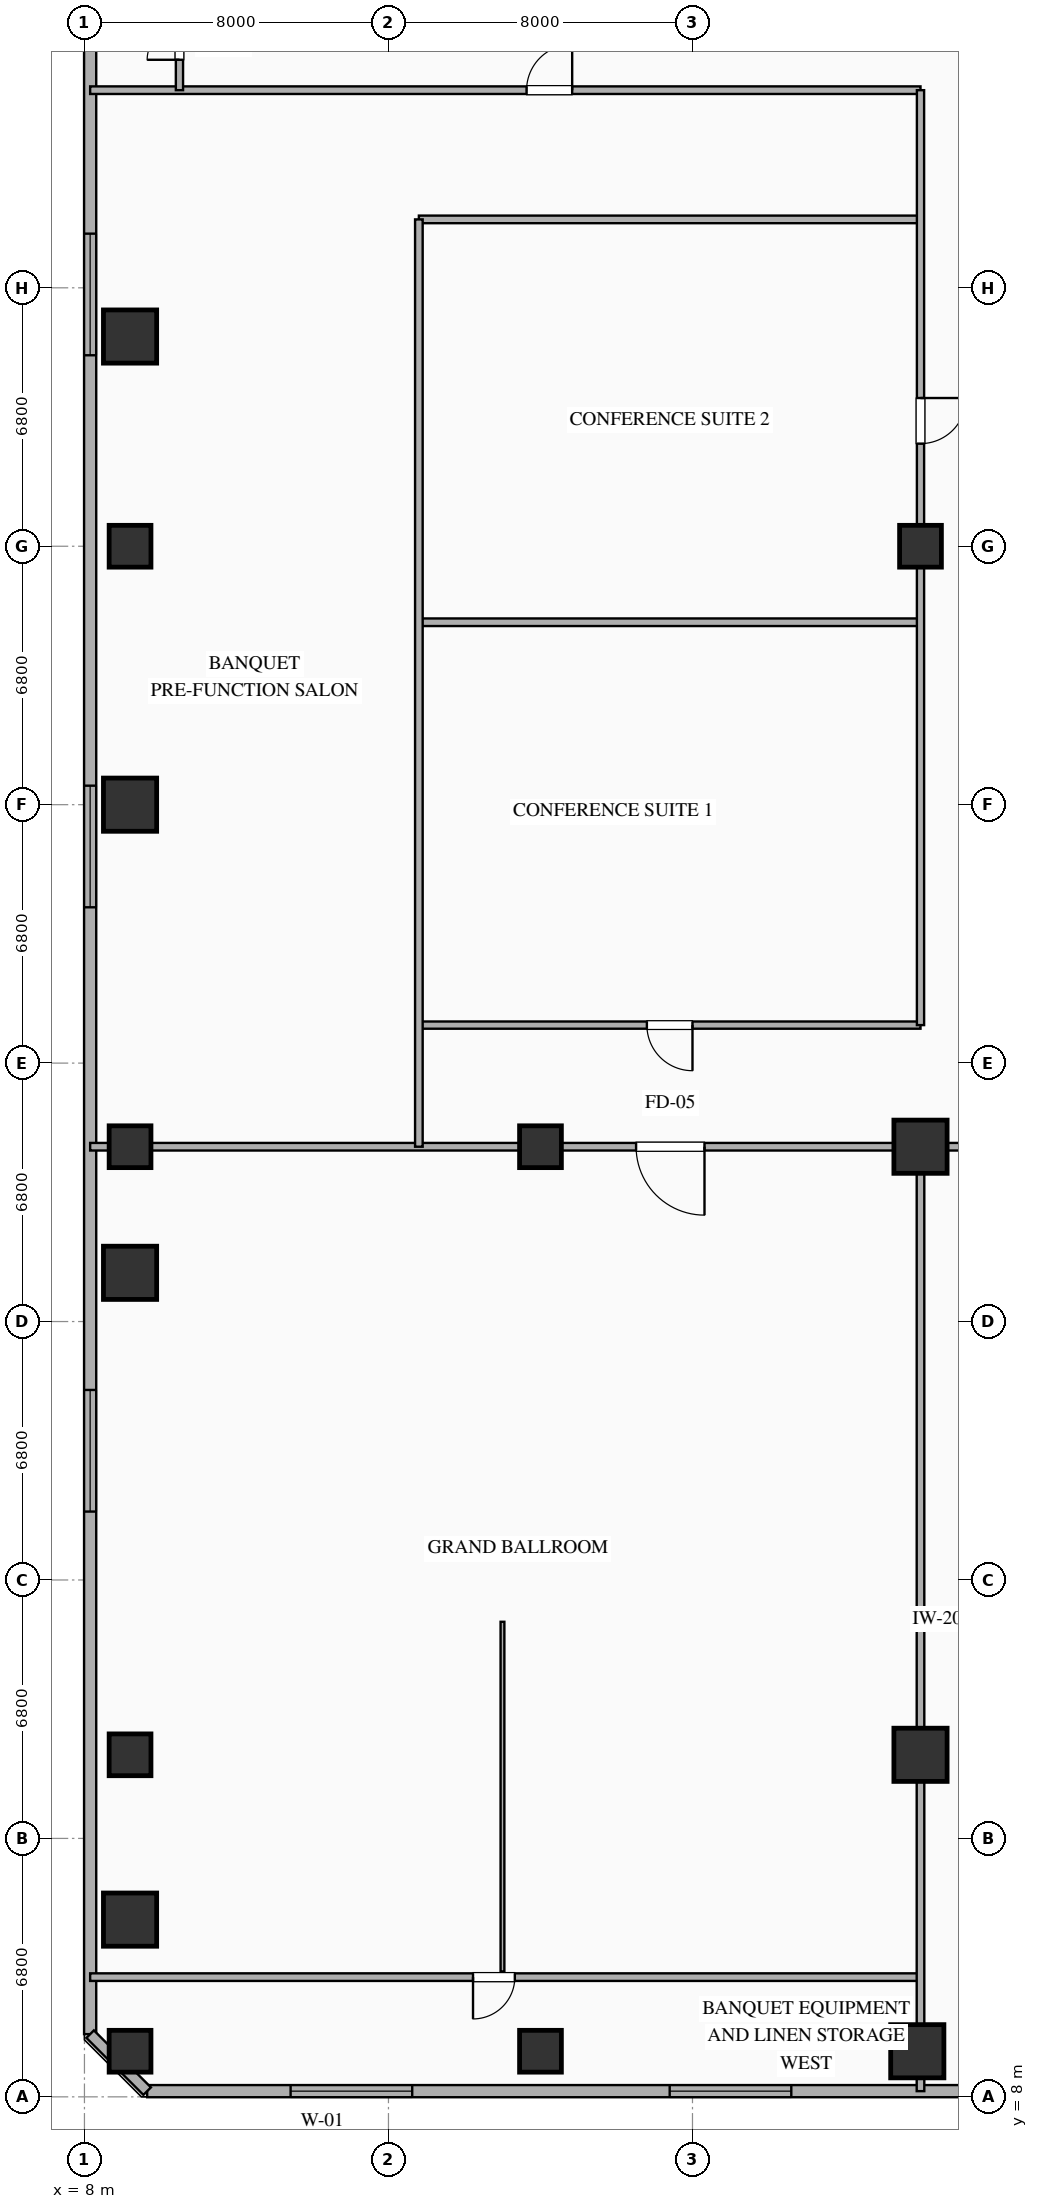
"""IFC4 building model, lengths in metres.
Left out: names, types, materials, properties, quantities, classifications, styles, units other than length and angle.
Written with IfcOpenShell. Run it as: python <this file> out.ifc"""

import sys

from ifc_helpers import new_model, si_unit, direction, frame, frame_2d, origin, origin_2d, place, context, subcontext, project, spatial, rectangle, extrude, element, fill, save


model = new_model("IFC4")
c1 = context("Model", 3, precision=1e-05, world=origin(), true_north=direction((0.0, 1.0)))
c2 = subcontext(c1, "Body", "Model", "MODEL_VIEW")
j1 = project(units=[si_unit("LENGTHUNIT", "METRE"), si_unit("PLANEANGLEUNIT", "RADIAN")], contexts=[c1])
p1 = place(None, origin())
s1 = spatial("IfcSite", under=j1, at=p1, CompositionType="ELEMENT")
p2 = place(p1, origin())
s2 = spatial("IfcBuilding", under=s1, at=p2, CompositionType="ELEMENT")
p3 = place(p2, frame((0.0, 0.0, 16.8)))
s3 = spatial("IfcBuildingStorey", under=s2, at=p3, CompositionType="ELEMENT", Elevation=16.8)
for number, where, z_axis, x_axis in (
    (1, (9.2, 9.2, 0.0), (0.0, 0.0, 1.0), (1.0, 0.0, 0.0)),
    (2, (20.0, 9.2, 0.0), (0.0, 0.0, 1.0), (1.0, 0.0, 0.0)),
    (3, (9.2, 17.0, 0.0), (0.0, 0.0, 1.0), (1.0, 0.0, 0.0)),
    (4, (9.2, 33.0, 0.0), (0.0, 0.0, 1.0), (1.0, 0.0, 0.0)),
    (5, (9.2, 48.8, 0.0), (0.0, 0.0, 1.0), (1.0, 0.0, 0.0)),
):
    element("IfcColumn", number, at=place(p3, frame(where, z_axis=z_axis, x_axis=x_axis)), inside=s3, PredefinedType="COLUMN", context=c2, shape_type="SweptSolid", body=[
        extrude(rectangle(XDim=1.1, YDim=1.1, at=origin_2d()), origin(), (0.0, 0.0, 1.0), 5.05),
    ])
p4 = place(p3, frame((30.0, 17.0, 0.0), z_axis=(0.0, 0.0, 1.0), x_axis=(1.0, 0.0, 0.0)))
e6 = element("IfcColumn", 6, at=p4, inside=s3, PredefinedType="COLUMN", context=c2, shape_type="SweptSolid", body=[
    extrude(rectangle(XDim=1.4, YDim=1.4, at=origin_2d()), origin(), (0.0, 0.0, 1.0), 5.05),
])
p5 = place(p3, frame((20.0, 33.0, 0.0), z_axis=(0.0, 0.0, 1.0), x_axis=(1.0, 0.0, 0.0)))
e7 = element("IfcColumn", 7, at=p5, inside=s3, PredefinedType="COLUMN", context=c2, shape_type="SweptSolid", body=[
    extrude(rectangle(XDim=1.1, YDim=1.1, at=origin_2d()), origin(), (0.0, 0.0, 1.0), 5.05),
])
p6 = place(p3, frame((30.0, 33.0, 0.0), z_axis=(0.0, 0.0, 1.0), x_axis=(1.0, 0.0, 0.0)))
e8 = element("IfcColumn", 8, at=p6, inside=s3, PredefinedType="COLUMN", context=c2, shape_type="SweptSolid", body=[
    extrude(rectangle(XDim=1.4, YDim=1.4, at=origin_2d()), origin(), (0.0, 0.0, 1.0), 5.05),
])
p7 = place(p3, frame((30.0, 48.8, 0.0), z_axis=(0.0, 0.0, 1.0), x_axis=(1.0, 0.0, 0.0)))
e9 = element("IfcColumn", 9, at=p7, inside=s3, PredefinedType="COLUMN", context=c2, shape_type="SweptSolid", body=[
    extrude(rectangle(XDim=1.1, YDim=1.1, at=origin_2d()), origin(), (0.0, 0.0, 1.0), 5.05),
])
for number, where, z_axis, x_axis in (
    (10, (9.2, 54.318, 0.0), (0.0, 0.0, 1.0), (1.0, 0.0, 0.0)),
    (11, (9.2, 42.0, 0.0), (0.0, 0.0, 1.0), (1.0, 0.0, 0.0)),
    (12, (9.2, 29.682, 0.0), (0.0, 0.0, 1.0), (1.0, 0.0, 0.0)),
    (13, (9.2, 12.663, 0.0), (0.0, 0.0, 1.0), (1.0, 0.0, 0.0)),
    (14, (29.916, 9.2, 0.0), (0.0, 0.0, 1.0), (1.0, 0.0, 0.0)),
):
    element("IfcColumn", number, at=place(p3, frame(where, z_axis=z_axis, x_axis=x_axis)), inside=s3, PredefinedType="COLUMN", context=c2, shape_type="SweptSolid", body=[
        extrude(rectangle(XDim=1.4, YDim=1.4, at=origin_2d()), origin(), (0.0, 0.0, 1.0), 5.05),
    ])
p8 = place(p3, frame((9.65, 8.15, 0.0), z_axis=(0.0, 0.0, 1.0), x_axis=(1.0, 0.0, 0.0)))
e15 = element("IfcWall", 15, at=p8, inside=s3, PredefinedType="SOLIDWALL", context=c2, shape_type="SweptSolid", body=[
    extrude(rectangle(XDim=76.7, YDim=0.32, at=frame_2d((38.35, 0.0))), origin(), (0.0, 0.0, 1.0), 5.05),
])
p9 = place(p8, frame((3.775, 0.0, 0.9)))
e16 = element("IfcOpeningElement", 16, at=p9, cuts=e15, PredefinedType="OPENING", context=c2, shape_type="SweptSolid", body=[
    extrude(rectangle(XDim=3.2, YDim=3.95, at=frame_2d((1.6, 1.975))), frame((0.0, 0.17, 0.0), z_axis=(0.0, -1.0, 0.0), x_axis=(1.0, 0.0, 0.0)), (0.0, 0.0, 1.0), 0.34),
])
p10 = place(p8, frame((13.75, 0.0, 0.9)))
e17 = element("IfcOpeningElement", 17, at=p10, cuts=e15, PredefinedType="OPENING", context=c2, shape_type="SweptSolid", body=[
    extrude(rectangle(XDim=3.2, YDim=3.95, at=frame_2d((1.6, 1.975))), frame((0.0, 0.17, 0.0), z_axis=(0.0, -1.0, 0.0), x_axis=(1.0, 0.0, 0.0)), (0.0, 0.0, 1.0), 0.34),
])
p11 = place(p8, frame((24.75, 0.0, 0.9)))
e18 = element("IfcOpeningElement", 18, at=p11, cuts=e15, PredefinedType="OPENING", context=c2, shape_type="SweptSolid", body=[
    extrude(rectangle(XDim=3.2, YDim=3.95, at=frame_2d((1.6, 1.975))), frame((0.0, 0.17, 0.0), z_axis=(0.0, -1.0, 0.0), x_axis=(1.0, 0.0, 0.0)), (0.0, 0.0, 1.0), 0.34),
])
p12 = place(p8, frame((36.75, 0.0, 0.9)))
e19 = element("IfcOpeningElement", 19, at=p12, cuts=e15, PredefinedType="OPENING", context=c2, shape_type="SweptSolid", body=[
    extrude(rectangle(XDim=3.2, YDim=3.95, at=frame_2d((1.6, 1.975))), frame((0.0, 0.17, 0.0), z_axis=(0.0, -1.0, 0.0), x_axis=(1.0, 0.0, 0.0)), (0.0, 0.0, 1.0), 0.34),
])
p13 = place(p3, frame((8.15, 74.35, 0.0), z_axis=(0.0, 0.0, 1.0), x_axis=(0.0, -1.0, 0.0)))
e20 = element("IfcWall", 20, at=p13, inside=s3, PredefinedType="SOLIDWALL", context=c2, shape_type="SweptSolid", body=[
    extrude(rectangle(XDim=64.7, YDim=0.32, at=frame_2d((32.35, 0.0))), origin(), (0.0, 0.0, 1.0), 5.05),
])
p14 = place(p13, frame((3.875, 0.0, 0.9)))
e21 = element("IfcOpeningElement", 21, at=p14, cuts=e20, PredefinedType="OPENING", context=c2, shape_type="SweptSolid", body=[
    extrude(rectangle(XDim=3.2, YDim=3.95, at=frame_2d((1.6, 1.975))), frame((0.0, 0.17, 0.0), z_axis=(0.0, -1.0, 0.0), x_axis=(1.0, 0.0, 0.0)), (0.0, 0.0, 1.0), 0.34),
])
p15 = place(p13, frame((17.325, 0.0, 0.9)))
e22 = element("IfcOpeningElement", 22, at=p15, cuts=e20, PredefinedType="OPENING", context=c2, shape_type="SweptSolid", body=[
    extrude(rectangle(XDim=3.2, YDim=3.95, at=frame_2d((1.6, 1.975))), frame((0.0, 0.17, 0.0), z_axis=(0.0, -1.0, 0.0), x_axis=(1.0, 0.0, 0.0)), (0.0, 0.0, 1.0), 0.34),
])
p16 = place(p13, frame((31.85, 0.0, 0.9)))
e23 = element("IfcOpeningElement", 23, at=p16, cuts=e20, PredefinedType="OPENING", context=c2, shape_type="SweptSolid", body=[
    extrude(rectangle(XDim=3.2, YDim=3.95, at=frame_2d((1.6, 1.975))), frame((0.0, 0.17, 0.0), z_axis=(0.0, -1.0, 0.0), x_axis=(1.0, 0.0, 0.0)), (0.0, 0.0, 1.0), 0.34),
])
p17 = place(p13, frame((47.75, 0.0, 0.9)))
e24 = element("IfcOpeningElement", 24, at=p17, cuts=e20, PredefinedType="OPENING", context=c2, shape_type="SweptSolid", body=[
    extrude(rectangle(XDim=3.2, YDim=3.95, at=frame_2d((1.6, 1.975))), frame((0.0, 0.17, 0.0), z_axis=(0.0, -1.0, 0.0), x_axis=(1.0, 0.0, 0.0)), (0.0, 0.0, 1.0), 0.34),
])
p18 = place(p3, frame((8.15, 9.65, 0.0), z_axis=(0.0, 0.0, 1.0), x_axis=(0.707106781187, -0.707106781187, 0.0)))
e25 = element("IfcWall", 25, at=p18, inside=s3, PredefinedType="SOLIDWALL", context=c2, shape_type="SweptSolid", body=[
    extrude(rectangle(XDim=2.121, YDim=0.28, at=frame_2d((1.061, 0.0))), origin(), (0.0, 0.0, 1.0), 5.05),
])
p19 = place(p3, frame((66.0, 33.0, 0.0), z_axis=(0.0, 0.0, 1.0), x_axis=(-1.0, 0.0, 0.0)))
e26 = element("IfcWall", 26, at=p19, inside=s3, PredefinedType="PARTITIONING", context=c2, shape_type="SweptSolid", body=[
    extrude(rectangle(XDim=57.85, YDim=0.2, at=frame_2d((28.925, 0.0))), origin(), (0.0, 0.0, 1.0), 3.65),
])
p20 = place(p19, frame((17.416, 0.0, 0.0)))
e27 = element("IfcOpeningElement", 27, at=p20, cuts=e26, PredefinedType="OPENING", context=c2, shape_type="SweptSolid", body=[
    extrude(rectangle(XDim=1.2, YDim=2.25, at=frame_2d((0.6, 1.125))), frame((0.0, 0.11, 0.0), z_axis=(0.0, -1.0, 0.0), x_axis=(1.0, 0.0, 0.0)), (0.0, 0.0, 1.0), 0.22),
])
p21 = place(p19, frame((41.684, 0.0, 0.0)))
e28 = element("IfcOpeningElement", 28, at=p21, cuts=e26, PredefinedType="OPENING", context=c2, shape_type="SweptSolid", body=[
    extrude(rectangle(XDim=1.8, YDim=2.2, at=frame_2d((0.9, 1.1))), frame((0.0, 0.11, 0.0), z_axis=(0.0, -1.0, 0.0), x_axis=(1.0, 0.0, 0.0)), (0.0, 0.0, 1.0), 0.22),
])
p22 = place(p3, frame((30.0, 11.15, 0.0), z_axis=(0.0, 0.0, 1.0), x_axis=(-1.0, 0.0, 0.0)))
e29 = element("IfcWall", 29, at=p22, inside=s3, PredefinedType="PARTITIONING", context=c2, shape_type="SweptSolid", body=[
    extrude(rectangle(XDim=21.85, YDim=0.2, at=frame_2d((10.925, 0.0))), origin(), (0.0, 0.0, 1.0), 3.65),
])
p23 = place(p22, frame((10.675, 0.0, 0.0)))
e30 = element("IfcOpeningElement", 30, at=p23, cuts=e29, PredefinedType="OPENING", context=c2, shape_type="SweptSolid", body=[
    extrude(rectangle(XDim=1.1, YDim=2.2, at=frame_2d((0.55, 1.1))), frame((0.0, 0.11, 0.0), z_axis=(0.0, -1.0, 0.0), x_axis=(1.0, 0.0, 0.0)), (0.0, 0.0, 1.0), 0.22),
])
p24 = place(p3, frame((30.0, 33.0, 0.0), z_axis=(0.0, 0.0, 1.0), x_axis=(0.0, -1.0, 0.0)))
e31 = element("IfcWall", 31, at=p24, inside=s3, PredefinedType="PARTITIONING", context=c2, shape_type="SweptSolid", body=[
    extrude(rectangle(XDim=24.85, YDim=0.2, at=frame_2d((12.425, 0.0))), origin(), (0.0, 0.0, 1.0), 3.65),
])
p25 = place(p3, frame((8.15, 60.8, 0.0), z_axis=(0.0, 0.0, 1.0), x_axis=(1.0, 0.0, 0.0)))
e32 = element("IfcWall", 32, at=p25, inside=s3, PredefinedType="PARTITIONING", context=c2, shape_type="SweptSolid", body=[
    extrude(rectangle(XDim=21.85, YDim=0.2, at=frame_2d((10.925, 0.0))), origin(), (0.0, 0.0, 1.0), 3.65),
])
p26 = place(p25, frame((11.484, 0.0, 0.0)))
e33 = element("IfcOpeningElement", 33, at=p26, cuts=e32, PredefinedType="OPENING", context=c2, shape_type="SweptSolid", body=[
    extrude(rectangle(XDim=1.2, YDim=2.25, at=frame_2d((0.6, 1.125))), frame((0.0, 0.11, 0.0), z_axis=(0.0, -1.0, 0.0), x_axis=(1.0, 0.0, 0.0)), (0.0, 0.0, 1.0), 0.22),
])
p27 = place(p3, frame((30.0, 36.2, 0.0), z_axis=(0.0, 0.0, 1.0), x_axis=(-1.0, 0.0, 0.0)))
e34 = element("IfcWall", 34, at=p27, inside=s3, PredefinedType="PARTITIONING", context=c2, shape_type="SweptSolid", body=[
    extrude(rectangle(XDim=13.2, YDim=0.19, at=frame_2d((6.6, 0.0))), origin(), (0.0, 0.0, 1.0), 3.65),
])
p28 = place(p27, frame((6.0, 0.0, 0.0)))
e35 = element("IfcOpeningElement", 35, at=p28, cuts=e34, PredefinedType="OPENING", context=c2, shape_type="SweptSolid", body=[
    extrude(rectangle(XDim=1.2, YDim=2.25, at=frame_2d((0.6, 1.125))), frame((0.0, 0.105, 0.0), z_axis=(0.0, -1.0, 0.0), x_axis=(1.0, 0.0, 0.0)), (0.0, 0.0, 1.0), 0.21),
])
for number, where, z_axis, x_axis in (
    (36, (16.8, 46.8, 0.0), (0.0, 0.0, 1.0), (1.0, 0.0, 0.0)),
    (37, (16.8, 57.4, 0.0), (0.0, 0.0, 1.0), (1.0, 0.0, 0.0)),
):
    element("IfcWall", number, at=place(p3, frame(where, z_axis=z_axis, x_axis=x_axis)), inside=s3, PredefinedType="PARTITIONING", context=c2, shape_type="SweptSolid", body=[
        extrude(rectangle(XDim=13.2, YDim=0.2, at=frame_2d((6.6, 0.0))), origin(), (0.0, 0.0, 1.0), 3.65),
    ])
p29 = place(p3, frame((30.0, 60.8, 0.0), z_axis=(0.0, 0.0, 1.0), x_axis=(0.0, -1.0, 0.0)))
e38 = element("IfcWall", 38, at=p29, inside=s3, PredefinedType="PARTITIONING", context=c2, shape_type="SweptSolid", body=[
    extrude(rectangle(XDim=24.6, YDim=0.19, at=frame_2d((12.3, 0.0))), origin(), (0.0, 0.0, 1.0), 3.65),
])
p30 = place(p29, frame((8.1, 0.0, 0.0)))
e39 = element("IfcOpeningElement", 39, at=p30, cuts=e38, PredefinedType="OPENING", context=c2, shape_type="SweptSolid", body=[
    extrude(rectangle(XDim=1.2, YDim=2.25, at=frame_2d((0.6, 1.125))), frame((0.0, 0.105, 0.0), z_axis=(0.0, -1.0, 0.0), x_axis=(1.0, 0.0, 0.0)), (0.0, 0.0, 1.0), 0.21),
])
p31 = place(p3, frame((16.8, 33.0, 0.0), z_axis=(0.0, 0.0, 1.0), x_axis=(0.0, 1.0, 0.0)))
e40 = element("IfcWall", 40, at=p31, inside=s3, PredefinedType="PARTITIONING", context=c2, shape_type="SweptSolid", body=[
    extrude(rectangle(XDim=24.4, YDim=0.2, at=frame_2d((12.2, 0.0))), origin(), (0.0, 0.0, 1.0), 3.65),
])
p32 = place(p3, frame((10.5, 60.8, 0.0), z_axis=(0.0, 0.0, 1.0), x_axis=(0.0, 1.0, 0.0)))
e41 = element("IfcWall", 41, at=p32, inside=s3, PredefinedType="PARTITIONING", context=c2, shape_type="SweptSolid", body=[
    extrude(rectangle(XDim=3.05, YDim=0.19, at=frame_2d((1.525, 0.0))), origin(), (0.0, 0.0, 1.0), 3.65),
])
p33 = place(p32, frame((0.8, 0.0, 0.0)))
e42 = element("IfcOpeningElement", 42, at=p33, cuts=e41, PredefinedType="OPENING", context=c2, shape_type="SweptSolid", body=[
    extrude(rectangle(XDim=0.85, YDim=2.15, at=frame_2d((0.425, 1.075))), frame((0.0, 0.105, 0.0), z_axis=(0.0, -1.0, 0.0), x_axis=(1.0, 0.0, 0.0)), (0.0, 0.0, 1.0), 0.21),
])
p34 = place(p3, frame((19.0, 11.3, 0.0), z_axis=(0.0, 0.0, 1.0), x_axis=(0.0, 1.0, 0.0)))
e43 = element("IfcWall", 43, at=p34, inside=s3, PredefinedType="MOVABLE", context=c2, shape_type="SweptSolid", body=[
    extrude(rectangle(XDim=9.2, YDim=0.1, at=frame_2d((4.6, 0.0))), origin(), (0.0, 0.0, 1.0), 3.65),
])
p35 = place(p9, origin())
e44 = element("IfcWindow", 44, at=p35, inside=s3, PartitioningType="SINGLE_PANEL", PredefinedType="WINDOW", context=c2, shape_type="SweptSolid", body=[
    extrude(rectangle(XDim=3.2, YDim=3.95, at=frame_2d((1.6, 1.975))), frame((0.0, 0.03, 0.0), z_axis=(0.0, -1.0, 0.0), x_axis=(1.0, 0.0, 0.0)), (0.0, 0.0, 1.0), 0.06),
])
fill(e16, e44)
p36 = place(p10, origin())
e45 = element("IfcWindow", 45, at=p36, inside=s3, PartitioningType="SINGLE_PANEL", PredefinedType="WINDOW", context=c2, shape_type="SweptSolid", body=[
    extrude(rectangle(XDim=3.2, YDim=3.95, at=frame_2d((1.6, 1.975))), frame((0.0, 0.03, 0.0), z_axis=(0.0, -1.0, 0.0), x_axis=(1.0, 0.0, 0.0)), (0.0, 0.0, 1.0), 0.06),
])
fill(e17, e45)
p37 = place(p15, origin())
e46 = element("IfcWindow", 46, at=p37, inside=s3, PartitioningType="SINGLE_PANEL", PredefinedType="WINDOW", context=c2, shape_type="SweptSolid", body=[
    extrude(rectangle(XDim=3.2, YDim=3.95, at=frame_2d((1.6, 1.975))), frame((0.0, 0.03, 0.0), z_axis=(0.0, -1.0, 0.0), x_axis=(1.0, 0.0, 0.0)), (0.0, 0.0, 1.0), 0.06),
])
fill(e22, e46)
p38 = place(p16, origin())
e47 = element("IfcWindow", 47, at=p38, inside=s3, PartitioningType="SINGLE_PANEL", PredefinedType="WINDOW", context=c2, shape_type="SweptSolid", body=[
    extrude(rectangle(XDim=3.2, YDim=3.95, at=frame_2d((1.6, 1.975))), frame((0.0, 0.03, 0.0), z_axis=(0.0, -1.0, 0.0), x_axis=(1.0, 0.0, 0.0)), (0.0, 0.0, 1.0), 0.06),
])
fill(e23, e47)
p39 = place(p17, origin())
e48 = element("IfcWindow", 48, at=p39, inside=s3, PartitioningType="SINGLE_PANEL", PredefinedType="WINDOW", context=c2, shape_type="SweptSolid", body=[
    extrude(rectangle(XDim=3.2, YDim=3.95, at=frame_2d((1.6, 1.975))), frame((0.0, 0.03, 0.0), z_axis=(0.0, -1.0, 0.0), x_axis=(1.0, 0.0, 0.0)), (0.0, 0.0, 1.0), 0.06),
])
fill(e24, e48)
p40 = place(p21, origin())
e49 = element("IfcDoor", 49, at=p40, inside=s3, OperationType="SINGLE_SWING_LEFT", PredefinedType="DOOR", context=c2, shape_type="SweptSolid", body=[
    extrude(rectangle(XDim=1.8, YDim=2.2, at=frame_2d((0.9, 1.1))), frame((0.0, 0.025, 0.0), z_axis=(0.0, -1.0, 0.0), x_axis=(1.0, 0.0, 0.0)), (0.0, 0.0, 1.0), 0.05),
])
fill(e28, e49)
p41 = place(p23, origin())
e50 = element("IfcDoor", 50, at=p41, inside=s3, OperationType="SINGLE_SWING_RIGHT", PredefinedType="DOOR", context=c2, shape_type="SweptSolid", body=[
    extrude(rectangle(XDim=1.1, YDim=2.2, at=frame_2d((0.55, 1.1))), frame((0.0, 0.025, 0.0), z_axis=(0.0, -1.0, 0.0), x_axis=(1.0, 0.0, 0.0)), (0.0, 0.0, 1.0), 0.05),
])
fill(e30, e50)
p42 = place(p26, origin())
e51 = element("IfcDoor", 51, at=p42, inside=s3, OperationType="SINGLE_SWING_RIGHT", PredefinedType="DOOR", context=c2, shape_type="SweptSolid", body=[
    extrude(rectangle(XDim=1.2, YDim=2.25, at=frame_2d((0.6, 1.125))), frame((0.0, 0.025, 0.0), z_axis=(0.0, -1.0, 0.0), x_axis=(1.0, 0.0, 0.0)), (0.0, 0.0, 1.0), 0.05),
])
fill(e33, e51)
p43 = place(p28, origin())
e52 = element("IfcDoor", 52, at=p43, inside=s3, OperationType="SINGLE_SWING_LEFT", PredefinedType="DOOR", context=c2, shape_type="SweptSolid", body=[
    extrude(rectangle(XDim=1.2, YDim=2.25, at=frame_2d((0.6, 1.125))), frame((0.0, 0.025, 0.0), z_axis=(0.0, -1.0, 0.0), x_axis=(1.0, 0.0, 0.0)), (0.0, 0.0, 1.0), 0.05),
])
fill(e35, e52)
p44 = place(p30, origin())
e53 = element("IfcDoor", 53, at=p44, inside=s3, OperationType="SINGLE_SWING_LEFT", PredefinedType="DOOR", context=c2, shape_type="SweptSolid", body=[
    extrude(rectangle(XDim=1.2, YDim=2.25, at=frame_2d((0.6, 1.125))), frame((0.0, 0.025, 0.0), z_axis=(0.0, -1.0, 0.0), x_axis=(1.0, 0.0, 0.0)), (0.0, 0.0, 1.0), 0.05),
])
fill(e39, e53)
p45 = place(p33, origin())
e54 = element("IfcDoor", 54, at=p45, inside=s3, OperationType="SINGLE_SWING_LEFT", PredefinedType="DOOR", context=c2, shape_type="SweptSolid", body=[
    extrude(rectangle(XDim=0.85, YDim=2.15, at=frame_2d((0.425, 1.075))), frame((0.0, 0.025, 0.0), z_axis=(0.0, -1.0, 0.0), x_axis=(1.0, 0.0, 0.0)), (0.0, 0.0, 1.0), 0.05),
])
fill(e42, e54)
save(model, sys.argv[1])
